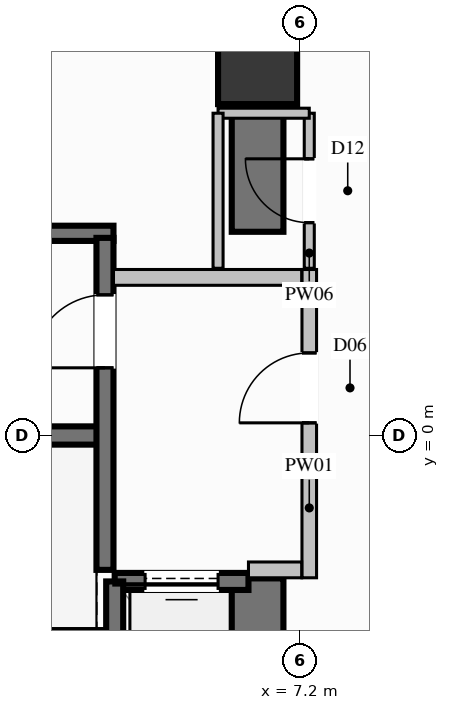
"""IFC4 building model, lengths in metres.
Left out: names, types, materials, properties, quantities, classifications, styles, units other than length and angle.
Written with IfcOpenShell. Run it as: python <this file> out.ifc"""

import sys

from ifc_helpers import new_model, si_unit, direction, frame, frame_2d, origin, origin_2d, place, context, subcontext, project, spatial, rectangle, extrude, element, fill, save


model = new_model("IFC4")
c1 = context("Model", 3, precision=1e-05, world=origin(), true_north=direction((0.0, 1.0)))
c2 = subcontext(c1, "Body", "Model", "MODEL_VIEW")
j1 = project(units=[si_unit("LENGTHUNIT", "METRE"), si_unit("PLANEANGLEUNIT", "RADIAN")], contexts=[c1])
p1 = place(None, origin())
s1 = spatial("IfcSite", under=j1, at=p1, CompositionType="ELEMENT")
p2 = place(p1, origin())
s2 = spatial("IfcBuilding", under=s1, at=p2, CompositionType="ELEMENT")
p3 = place(p2, frame((0.0, 0.0, -4.8)))
s3 = spatial("IfcBuildingStorey", under=s2, at=p3, CompositionType="ELEMENT", Elevation=-4.8)
p4 = place(p3, frame((6.5, 6.1, 0.0), z_axis=(0.0, 0.0, 1.0), x_axis=(1.0, 0.0, 0.0)))
e1 = element("IfcColumn", 1, at=p4, inside=s3, PredefinedType="COLUMN", context=c2, shape_type="SweptSolid", body=[
    extrude(rectangle(XDim=1.3, YDim=1.3, at=origin_2d()), origin(), (0.0, 0.0, 1.0), 4.8),
])
p5 = place(p3, frame((-3.99, 0.0, 0.0), z_axis=(0.0, 0.0, 1.0), x_axis=(1.0, 0.0, 0.0)))
e2 = element("IfcWall", 2, at=p5, inside=s3, PredefinedType="SHEAR", context=c2, shape_type="SweptSolid", body=[
    extrude(rectangle(XDim=7.98, YDim=0.3, at=frame_2d((3.99, 0.0))), origin(), (0.0, 0.0, 1.0), 4.8),
])
for number, where, z_axis, x_axis in (
    (3, (-4.13, -3.325, 0.0), (0.0, 0.0, 1.0), (1.0, 0.0, 0.0)),
    (4, (-4.13, 3.325, 0.0), (0.0, 0.0, 1.0), (1.0, 0.0, 0.0)),
):
    element("IfcWall", number, at=place(p3, frame(where, z_axis=z_axis, x_axis=x_axis)), inside=s3, PredefinedType="SOLIDWALL", context=c2, shape_type="SweptSolid", body=[
        extrude(rectangle(XDim=8.26, YDim=0.25, at=frame_2d((4.13, 0.0))), origin(), (0.0, 0.0, 1.0), 4.8),
    ])
p6 = place(p3, frame((5.85, 6.1, 0.0), z_axis=(0.0, 0.0, 1.0), x_axis=(1.0, 0.0, 0.0)))
e5 = element("IfcWall", 5, at=p6, inside=s3, PredefinedType="SHEAR", context=c2, shape_type="SweptSolid", body=[
    extrude(rectangle(XDim=0.225, YDim=0.85, at=frame_2d((0.112, 0.0))), origin(), (0.0, 0.0, 1.0), 4.8),
])
p7 = place(p3, frame((6.5, -6.525, 0.0), z_axis=(0.0, 0.0, 1.0), x_axis=(0.0, 1.0, 0.0)))
e6 = element("IfcWall", 6, at=p7, inside=s3, PredefinedType="SHEAR", context=c2, shape_type="SweptSolid", body=[
    extrude(rectangle(XDim=4.175, YDim=0.85, at=frame_2d((2.087, 0.0))), origin(), (0.0, 0.0, 1.0), 4.8),
])
p8 = place(p3, frame((6.5, 3.35, 0.0), z_axis=(0.0, 0.0, 1.0), x_axis=(0.0, 1.0, 0.0)))
e7 = element("IfcWall", 7, at=p8, inside=s3, PredefinedType="SHEAR", context=c2, shape_type="SweptSolid", body=[
    extrude(rectangle(XDim=3.175, YDim=0.85, at=frame_2d((1.587, 0.0))), origin(), (0.0, 0.0, 1.0), 4.8),
])
p9 = place(p3, frame((6.35, -2.4, 0.0), z_axis=(0.0, 0.0, 1.0), x_axis=(-1.0, 0.0, 0.0)))
e8 = element("IfcWall", 8, at=p9, inside=s3, PredefinedType="SOLIDWALL", context=c2, shape_type="SweptSolid", body=[
    extrude(rectangle(XDim=2.2, YDim=0.28, at=frame_2d((1.1, 0.0))), origin(), (0.0, 0.0, 1.0), 4.395),
])
p10 = place(p9, frame((0.5, 0.0, 0.0)))
e9 = element("IfcOpeningElement", 9, at=p10, cuts=e8, PredefinedType="OPENING", context=c2, shape_type="SweptSolid", body=[
    extrude(rectangle(XDim=1.2, YDim=2.2, at=frame_2d((0.6, 1.1))), frame((0.0, 0.15, 0.0), z_axis=(0.0, -1.0, 0.0), x_axis=(1.0, 0.0, 0.0)), (0.0, 0.0, 1.0), 0.3),
])
p11 = place(p3, frame((4.15, -2.4, 0.0), z_axis=(0.0, 0.0, 1.0), x_axis=(0.0, -1.0, 0.0)))
e10 = element("IfcWall", 10, at=p11, inside=s3, PredefinedType="SOLIDWALL", context=c2, shape_type="SweptSolid", body=[
    extrude(rectangle(XDim=2.7, YDim=0.28, at=frame_2d((1.35, 0.0))), origin(), (0.0, 0.0, 1.0), 4.395),
])
p12 = place(p3, frame((3.99, -2.21, 0.0), z_axis=(0.0, 0.0, 1.0), x_axis=(0.0, 1.0, 0.0)))
e11 = element("IfcWall", 11, at=p12, inside=s3, PredefinedType="SOLIDWALL", context=c2, shape_type="SweptSolid", body=[
    extrude(rectangle(XDim=5.46, YDim=0.28, at=frame_2d((2.73, 0.0))), origin(), (0.0, 0.0, 1.0), 4.395),
])
p13 = place(p12, frame((3.323, 0.0, 0.0)))
e12 = element("IfcOpeningElement", 12, at=p13, cuts=e11, PredefinedType="OPENING", context=c2, shape_type="SweptSolid", body=[
    extrude(rectangle(XDim=1.2, YDim=2.2, at=frame_2d((0.6, 1.1))), frame((0.0, 0.15, 0.0), z_axis=(0.0, -1.0, 0.0), x_axis=(1.0, 0.0, 0.0)), (0.0, 0.0, 1.0), 0.3),
])
p14 = place(p3, frame((7.35, -2.34, 0.0), z_axis=(0.0, 0.0, 1.0), x_axis=(0.0, 1.0, 0.0)))
e13 = element("IfcWall", 13, at=p14, inside=s3, PredefinedType="PARTITIONING", context=c2, shape_type="SweptSolid", body=[
    extrude(rectangle(XDim=5.07, YDim=0.24, at=frame_2d((2.535, 0.0))), origin(), (0.0, 0.0, 1.0), 3.28),
])
p15 = place(p14, frame((2.548, 0.0, 0.0)))
e14 = element("IfcOpeningElement", 14, at=p15, cuts=e13, PredefinedType="OPENING", context=c2, shape_type="SweptSolid", body=[
    extrude(rectangle(XDim=1.15, YDim=2.2, at=frame_2d((0.575, 1.1))), frame((0.0, 0.13, 0.0), z_axis=(0.0, -1.0, 0.0), x_axis=(1.0, 0.0, 0.0)), (0.0, 0.0, 1.0), 0.26),
])
p16 = place(p3, frame((6.35, -2.21, 0.0), z_axis=(0.0, 0.0, 1.0), x_axis=(1.0, 0.0, 0.0)))
e15 = element("IfcWall", 15, at=p16, inside=s3, PredefinedType="PARTITIONING", context=c2, shape_type="SweptSolid", body=[
    extrude(rectangle(XDim=0.875, YDim=0.26, at=frame_2d((0.438, 0.0))), origin(), (0.0, 0.0, 1.0), 4.395),
])
p17 = place(p3, frame((4.13, 2.6, 0.0), z_axis=(0.0, 0.0, 1.0), x_axis=(1.0, 0.0, 0.0)))
e16 = element("IfcWall", 16, at=p17, inside=s3, PredefinedType="PARTITIONING", context=c2, shape_type="SweptSolid", body=[
    extrude(rectangle(XDim=3.095, YDim=0.26, at=frame_2d((1.548, 0.0))), origin(), (0.0, 0.0, 1.0), 4.395),
])
p18 = place(p3, frame((7.35, 2.75, 0.0), z_axis=(0.0, 0.0, 1.0), x_axis=(0.0, 1.0, 0.0)))
e17 = element("IfcWall", 17, at=p18, inside=s3, PredefinedType="PARTITIONING", context=c2, shape_type="SweptSolid", body=[
    extrude(rectangle(XDim=2.55, YDim=0.165, at=frame_2d((1.275, 0.0))), origin(), (0.0, 0.0, 1.0), 3.28),
])
p19 = place(p18, frame((0.75, 0.0, 0.0)))
e18 = element("IfcOpeningElement", 18, at=p19, cuts=e17, PredefinedType="OPENING", context=c2, shape_type="SweptSolid", body=[
    extrude(rectangle(XDim=1.05, YDim=2.15, at=frame_2d((0.525, 1.075))), frame((0.0, 0.093, 0.0), z_axis=(0.0, -1.0, 0.0), x_axis=(1.0, 0.0, 0.0)), (0.0, 0.0, 1.0), 0.185),
])
p20 = place(p3, frame((7.35, 5.3, 0.0), z_axis=(0.0, 0.0, 1.0), x_axis=(-1.0, 0.0, 0.0)))
e19 = element("IfcWall", 19, at=p20, inside=s3, PredefinedType="PARTITIONING", context=c2, shape_type="SweptSolid", body=[
    extrude(rectangle(XDim=1.5, YDim=0.165, at=frame_2d((0.75, 0.0))), origin(), (0.0, 0.0, 1.0), 3.28),
])
p21 = place(p3, frame((5.85, 5.3, 0.0), z_axis=(0.0, 0.0, 1.0), x_axis=(0.0, -1.0, 0.0)))
e20 = element("IfcWall", 20, at=p21, inside=s3, PredefinedType="PARTITIONING", context=c2, shape_type="SweptSolid", body=[
    extrude(rectangle(XDim=2.55, YDim=0.165, at=frame_2d((1.275, 0.0))), origin(), (0.0, 0.0, 1.0), 3.28),
])
p22 = place(p10, origin())
e21 = element("IfcDoor", 21, at=p22, inside=s3, OperationType="SLIDING_TO_LEFT", PredefinedType="DOOR", context=c2, shape_type="SweptSolid", body=[
    extrude(rectangle(XDim=1.2, YDim=2.2, at=frame_2d((0.6, 1.1))), frame((0.0, 0.025, 0.0), z_axis=(0.0, -1.0, 0.0), x_axis=(1.0, 0.0, 0.0)), (0.0, 0.0, 1.0), 0.05),
])
fill(e9, e21)
p23 = place(p13, origin())
e22 = element("IfcDoor", 22, at=p23, inside=s3, OperationType="SINGLE_SWING_LEFT", PredefinedType="DOOR", context=c2, shape_type="SweptSolid", body=[
    extrude(rectangle(XDim=1.2, YDim=2.2, at=frame_2d((0.6, 1.1))), frame((0.0, 0.025, 0.0), z_axis=(0.0, -1.0, 0.0), x_axis=(1.0, 0.0, 0.0)), (0.0, 0.0, 1.0), 0.05),
])
fill(e12, e22)
p24 = place(p15, origin())
e23 = element("IfcDoor", 23, at=p24, inside=s3, OperationType="SINGLE_SWING_LEFT", PredefinedType="DOOR", context=c2, shape_type="SweptSolid", body=[
    extrude(rectangle(XDim=1.15, YDim=2.2, at=frame_2d((0.575, 1.1))), frame((0.0, 0.025, 0.0), z_axis=(0.0, -1.0, 0.0), x_axis=(1.0, 0.0, 0.0)), (0.0, 0.0, 1.0), 0.05),
])
fill(e14, e23)
p25 = place(p19, origin())
e24 = element("IfcDoor", 24, at=p25, inside=s3, OperationType="SINGLE_SWING_RIGHT", PredefinedType="DOOR", context=c2, shape_type="SweptSolid", body=[
    extrude(rectangle(XDim=1.05, YDim=2.15, at=frame_2d((0.525, 1.075))), frame((0.0, 0.025, 0.0), z_axis=(0.0, -1.0, 0.0), x_axis=(1.0, 0.0, 0.0)), (0.0, 0.0, 1.0), 0.05),
])
fill(e18, e24)
save(model, sys.argv[1])
